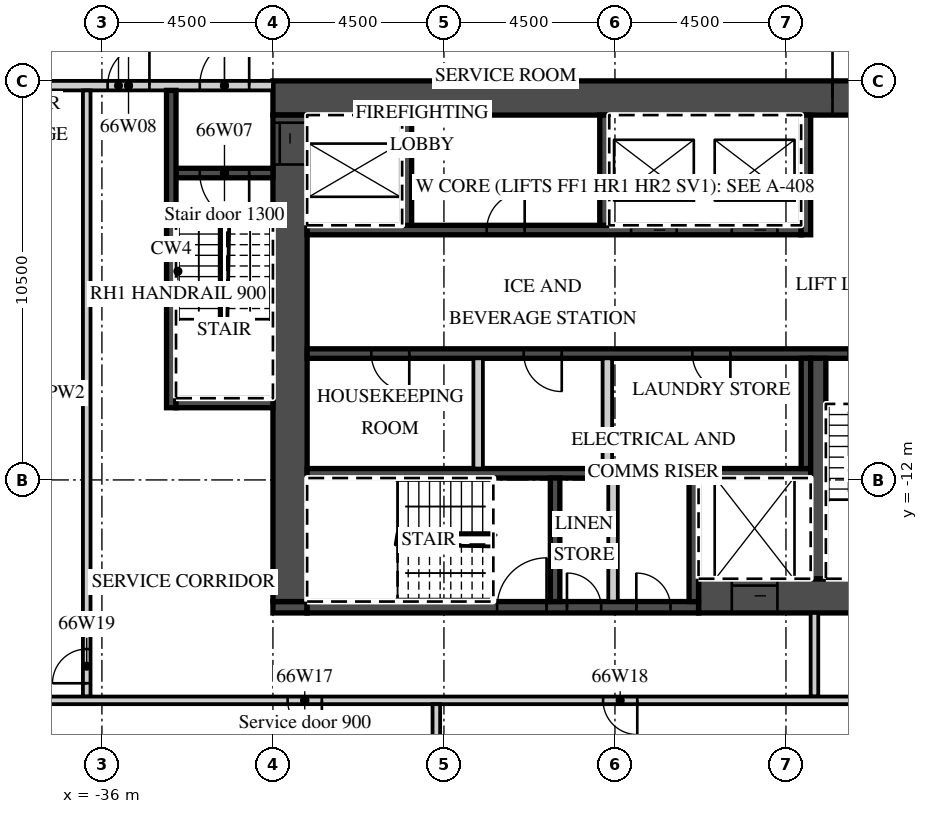
"""IFC4 building model, lengths in metres.
Left out: names, types, materials, properties, quantities, classifications, styles, units other than length and angle.
Written with IfcOpenShell. Run it as: python <this file> out.ifc"""

import sys

from ifc_helpers import new_model, si_unit, direction, frame, frame_2d, origin, place, context, subcontext, project, spatial, rectangle, extrude, element, fill, save


model = new_model("IFC4")
c1 = context("Model", 3, precision=1e-05, world=origin(), true_north=direction((0.0, 1.0)))
c2 = subcontext(c1, "Body", "Model", "MODEL_VIEW")
j1 = project(units=[si_unit("LENGTHUNIT", "METRE"), si_unit("PLANEANGLEUNIT", "RADIAN")], contexts=[c1])
p1 = place(None, origin())
s1 = spatial("IfcSite", under=j1, at=p1, CompositionType="ELEMENT")
p2 = place(p1, origin())
s2 = spatial("IfcBuilding", under=s1, at=p2, CompositionType="ELEMENT")
p3 = place(p2, frame((0.0, 0.0, 268.5)))
s3 = spatial("IfcBuildingStorey", under=s2, at=p3, CompositionType="ELEMENT", Elevation=268.5)
p4 = place(p3, frame((-31.5, -1.95, 0.0), z_axis=(0.0, 0.0, 1.0), x_axis=(1.0, 0.0, 0.0)))
e1 = element("IfcWall", 1, at=p4, inside=s3, PredefinedType="SHEAR", context=c2, shape_type="SweptSolid", body=[
    extrude(rectangle(XDim=18.0, YDim=0.9, at=frame_2d((9.0, 0.0))), origin(), (0.0, 0.0, 1.0), 3.02),
])
p5 = place(p4, frame((14.725, 0.0, 0.0)))
e2 = element("IfcOpeningElement", 2, at=p5, cuts=e1, PredefinedType="OPENING", context=c2, shape_type="SweptSolid", body=[
    extrude(rectangle(XDim=1.8, YDim=2.1, at=frame_2d((0.9, 1.05))), frame((0.0, 0.46, 0.0), z_axis=(0.0, -1.0, 0.0), x_axis=(1.0, 0.0, 0.0)), (0.0, 0.0, 1.0), 0.92),
])
p6 = place(p3, frame((-20.3, -15.05, 0.0), z_axis=(0.0, 0.0, 1.0), x_axis=(1.0, 0.0, 0.0)))
e3 = element("IfcWall", 3, at=p6, inside=s3, PredefinedType="SHEAR", context=c2, shape_type="SweptSolid", body=[
    extrude(rectangle(XDim=6.8, YDim=0.9, at=frame_2d((3.4, 0.0))), origin(), (0.0, 0.0, 1.0), 3.02),
])
p7 = place(p6, frame((0.875, 0.0, 0.0)))
e4 = element("IfcOpeningElement", 4, at=p7, cuts=e3, PredefinedType="OPENING", context=c2, shape_type="SweptSolid", body=[
    extrude(rectangle(XDim=1.2, YDim=2.1, at=frame_2d((0.6, 1.05))), frame((0.0, 0.46, 0.0), z_axis=(0.0, -1.0, 0.0), x_axis=(1.0, 0.0, 0.0)), (0.0, 0.0, 1.0), 0.92),
])
p8 = place(p3, frame((-31.5, -15.35, 0.0), z_axis=(0.0, 0.0, 1.0), x_axis=(1.0, 0.0, 0.0)))
e5 = element("IfcWall", 5, at=p8, inside=s3, PredefinedType="SHEAR", context=c2, shape_type="SweptSolid", body=[
    extrude(rectangle(XDim=0.9, YDim=0.3, at=frame_2d((0.45, 0.0))), origin(), (0.0, 0.0, 1.0), 3.02),
])
p9 = place(p3, frame((-30.6, -15.35, 0.0), z_axis=(0.0, 0.0, 1.0), x_axis=(1.0, 0.0, 0.0)))
e6 = element("IfcWall", 6, at=p9, inside=s3, PredefinedType="SHEAR", context=c2, shape_type="SweptSolid", body=[
    extrude(rectangle(XDim=10.3, YDim=0.3, at=frame_2d((5.15, 0.0))), origin(), (0.0, 0.0, 1.0), 3.02),
])
p10 = place(p9, frame((5.0, 0.0, 0.0)))
e7 = element("IfcOpeningElement", 7, at=p10, cuts=e6, PredefinedType="OPENING", context=c2, shape_type="SweptSolid", body=[
    extrude(rectangle(XDim=1.3, YDim=2.1, at=frame_2d((0.65, 1.05))), frame((0.0, 0.16, 0.0), z_axis=(0.0, -1.0, 0.0), x_axis=(1.0, 0.0, 0.0)), (0.0, 0.0, 1.0), 0.32),
])
p11 = place(p9, frame((6.837, 0.0, 0.0)))
e8 = element("IfcOpeningElement", 8, at=p11, cuts=e6, PredefinedType="OPENING", context=c2, shape_type="SweptSolid", body=[
    extrude(rectangle(XDim=0.9, YDim=2.1, at=frame_2d((0.45, 1.05))), frame((0.0, 0.16, 0.0), z_axis=(0.0, -1.0, 0.0), x_axis=(1.0, 0.0, 0.0)), (0.0, 0.0, 1.0), 0.32),
])
p12 = place(p9, frame((8.663, 0.0, 0.0)))
e9 = element("IfcOpeningElement", 9, at=p12, cuts=e6, PredefinedType="OPENING", context=c2, shape_type="SweptSolid", body=[
    extrude(rectangle(XDim=0.9, YDim=2.1, at=frame_2d((0.45, 1.05))), frame((0.0, 0.16, 0.0), z_axis=(0.0, -1.0, 0.0), x_axis=(1.0, 0.0, 0.0)), (0.0, 0.0, 1.0), 0.32),
])
p13 = place(p3, frame((-31.05, -15.2, 0.0), z_axis=(0.0, 0.0, 1.0), x_axis=(0.0, 1.0, 0.0)))
e10 = element("IfcWall", 10, at=p13, inside=s3, PredefinedType="SHEAR", context=c2, shape_type="SweptSolid", body=[
    extrude(rectangle(XDim=12.8, YDim=0.9, at=frame_2d((6.4, 0.0))), origin(), (0.0, 0.0, 1.0), 3.02),
])
p14 = place(p13, frame((11.5, 0.0, 0.0)))
e11 = element("IfcOpeningElement", 11, at=p14, cuts=e10, PredefinedType="OPENING", context=c2, shape_type="SweptSolid", body=[
    extrude(rectangle(XDim=1.1, YDim=2.1, at=frame_2d((0.55, 1.05))), frame((0.0, 0.46, 0.0), z_axis=(0.0, -1.0, 0.0), x_axis=(1.0, 0.0, 0.0)), (0.0, 0.0, 1.0), 0.92),
])
p15 = place(p3, frame((-30.6, -5.425, 0.0), z_axis=(0.0, 0.0, 1.0), x_axis=(1.0, 0.0, 0.0)))
e12 = element("IfcWall", 12, at=p15, inside=s3, PredefinedType="SHEAR", context=c2, shape_type="SweptSolid", body=[
    extrude(rectangle(XDim=13.0, YDim=0.25, at=frame_2d((6.5, 0.0))), origin(), (0.0, 0.0, 1.0), 3.02),
])
p16 = place(p15, frame((8.525, 0.0, 0.0)))
e13 = element("IfcOpeningElement", 13, at=p16, cuts=e12, PredefinedType="OPENING", context=c2, shape_type="SweptSolid", body=[
    extrude(rectangle(XDim=1.2, YDim=2.1, at=frame_2d((0.6, 1.05))), frame((0.0, 0.135, 0.0), z_axis=(0.0, -1.0, 0.0), x_axis=(1.0, 0.0, 0.0)), (0.0, 0.0, 1.0), 0.27),
])
p17 = place(p15, frame((11.175, 0.0, 0.0)))
e14 = element("IfcOpeningElement", 14, at=p17, cuts=e12, PredefinedType="OPENING", context=c2, shape_type="SweptSolid", body=[
    extrude(rectangle(XDim=1.2, YDim=2.1, at=frame_2d((0.6, 1.05))), frame((0.0, 0.135, 0.0), z_axis=(0.0, -1.0, 0.0), x_axis=(1.0, 0.0, 0.0)), (0.0, 0.0, 1.0), 0.27),
])
p18 = place(p15, frame((4.725, 0.0, 0.0)))
e15 = element("IfcOpeningElement", 15, at=p18, cuts=e12, PredefinedType="OPENING", context=c2, shape_type="SweptSolid", body=[
    extrude(rectangle(XDim=1.0, YDim=2.1, at=frame_2d((0.5, 1.05))), frame((0.0, 0.135, 0.0), z_axis=(0.0, -1.0, 0.0), x_axis=(1.0, 0.0, 0.0)), (0.0, 0.0, 1.0), 0.27),
])
p19 = place(p3, frame((-17.475, -5.55, 0.0), z_axis=(0.0, 0.0, 1.0), x_axis=(0.0, 1.0, 0.0)))
e16 = element("IfcWall", 16, at=p19, inside=s3, PredefinedType="SHEAR", context=c2, shape_type="SweptSolid", body=[
    extrude(rectangle(XDim=3.15, YDim=0.25, at=frame_2d((1.575, 0.0))), origin(), (0.0, 0.0, 1.0), 3.02),
])
for number, where, z_axis, x_axis in (
    (17, (-27.975, -5.3, 0.0), (0.0, 0.0, 1.0), (0.0, 1.0, 0.0)),
    (18, (-22.775, -5.3, 0.0), (0.0, 0.0, 1.0), (0.0, 1.0, 0.0)),
):
    element("IfcWall", number, at=place(p3, frame(where, z_axis=z_axis, x_axis=x_axis)), inside=s3, PredefinedType="SHEAR", context=c2, shape_type="SweptSolid", body=[
        extrude(rectangle(XDim=2.9, YDim=0.25, at=frame_2d((1.45, 0.0))), origin(), (0.0, 0.0, 1.0), 3.02),
    ])
p20 = place(p3, frame((-30.6, -8.675, 0.0), z_axis=(0.0, 0.0, 1.0), x_axis=(1.0, 0.0, 0.0)))
e19 = element("IfcWall", 19, at=p20, inside=s3, PredefinedType="SHEAR", context=c2, shape_type="SweptSolid", body=[
    extrude(rectangle(XDim=16.2, YDim=0.25, at=frame_2d((8.1, 0.0))), origin(), (0.0, 0.0, 1.0), 3.02),
])
p21 = place(p20, frame((14.25, 0.0, 0.0)))
e20 = element("IfcOpeningElement", 20, at=p21, cuts=e19, PredefinedType="OPENING", context=c2, shape_type="SweptSolid", body=[
    extrude(rectangle(XDim=1.3, YDim=2.1, at=frame_2d((0.65, 1.05))), frame((0.0, 0.135, 0.0), z_axis=(0.0, -1.0, 0.0), x_axis=(1.0, 0.0, 0.0)), (0.0, 0.0, 1.0), 0.27),
])
p22 = place(p20, frame((1.688, 0.0, 0.0)))
e21 = element("IfcOpeningElement", 21, at=p22, cuts=e19, PredefinedType="OPENING", context=c2, shape_type="SweptSolid", body=[
    extrude(rectangle(XDim=1.0, YDim=2.1, at=frame_2d((0.5, 1.05))), frame((0.0, 0.135, 0.0), z_axis=(0.0, -1.0, 0.0), x_axis=(1.0, 0.0, 0.0)), (0.0, 0.0, 1.0), 0.27),
])
p23 = place(p20, frame((5.7, 0.0, 0.0)))
e22 = element("IfcOpeningElement", 22, at=p23, cuts=e19, PredefinedType="OPENING", context=c2, shape_type="SweptSolid", body=[
    extrude(rectangle(XDim=1.0, YDim=2.1, at=frame_2d((0.5, 1.05))), frame((0.0, 0.135, 0.0), z_axis=(0.0, -1.0, 0.0), x_axis=(1.0, 0.0, 0.0)), (0.0, 0.0, 1.0), 0.27),
])
p24 = place(p20, frame((10.137, 0.0, 0.0)))
e23 = element("IfcOpeningElement", 23, at=p24, cuts=e19, PredefinedType="OPENING", context=c2, shape_type="SweptSolid", body=[
    extrude(rectangle(XDim=1.0, YDim=2.1, at=frame_2d((0.5, 1.05))), frame((0.0, 0.135, 0.0), z_axis=(0.0, -1.0, 0.0), x_axis=(1.0, 0.0, 0.0)), (0.0, 0.0, 1.0), 0.27),
])
p25 = place(p3, frame((-30.6, -11.825, 0.0), z_axis=(0.0, 0.0, 1.0), x_axis=(1.0, 0.0, 0.0)))
e24 = element("IfcWall", 24, at=p25, inside=s3, PredefinedType="SHEAR", context=c2, shape_type="SweptSolid", body=[
    extrude(rectangle(XDim=13.25, YDim=0.25, at=frame_2d((6.625, 0.0))), origin(), (0.0, 0.0, 1.0), 3.02),
])
p26 = place(p3, frame((-17.475, -11.7, 0.0), z_axis=(0.0, 0.0, 1.0), x_axis=(0.0, 1.0, 0.0)))
e25 = element("IfcWall", 25, at=p26, inside=s3, PredefinedType="SHEAR", context=c2, shape_type="SweptSolid", body=[
    extrude(rectangle(XDim=2.9, YDim=0.25, at=frame_2d((1.45, 0.0))), origin(), (0.0, 0.0, 1.0), 3.02),
])
for number, where, z_axis, x_axis in (
    (26, (-26.1, -11.7, 0.0), (0.0, 0.0, 1.0), (0.0, 1.0, 0.0)),
    (27, (-22.7, -11.7, 0.0), (0.0, 0.0, 1.0), (0.0, 1.0, 0.0)),
):
    element("IfcWall", number, at=place(p3, frame(where, z_axis=z_axis, x_axis=x_axis)), inside=s3, PredefinedType="PARTITIONING", context=c2, shape_type="SweptSolid", body=[
        extrude(rectangle(XDim=2.9, YDim=0.25, at=frame_2d((1.45, 0.0))), origin(), (0.0, 0.0, 1.0), 3.02),
    ])
p27 = place(p3, frame((-17.15, -14.6, 0.0), z_axis=(0.0, 0.0, 1.0), x_axis=(0.0, 1.0, 0.0)))
e28 = element("IfcWall", 28, at=p27, inside=s3, PredefinedType="SHEAR", context=c2, shape_type="SweptSolid", body=[
    extrude(rectangle(XDim=5.8, YDim=0.4, at=frame_2d((2.9, 0.0))), origin(), (0.0, 0.0, 1.0), 3.02),
])
for number, where, z_axis, x_axis in (
    (29, (-20.425, -15.2, 0.0), (0.0, 0.0, 1.0), (0.0, 1.0, 0.0)),
    (30, (-24.075, -15.2, 0.0), (0.0, 0.0, 1.0), (0.0, 1.0, 0.0)),
):
    element("IfcWall", number, at=place(p3, frame(where, z_axis=z_axis, x_axis=x_axis)), inside=s3, PredefinedType="SHEAR", context=c2, shape_type="SweptSolid", body=[
        extrude(rectangle(XDim=3.25, YDim=0.25, at=frame_2d((1.625, 0.0))), origin(), (0.0, 0.0, 1.0), 3.02),
    ])
p28 = place(p3, frame((-22.55, -15.2, 0.0), z_axis=(0.0, 0.0, 1.0), x_axis=(0.0, 1.0, 0.0)))
e31 = element("IfcWall", 31, at=p28, inside=s3, PredefinedType="PARTITIONING", context=c2, shape_type="SweptSolid", body=[
    extrude(rectangle(XDim=3.25, YDim=0.25, at=frame_2d((1.625, 0.0))), origin(), (0.0, 0.0, 1.0), 3.02),
])
p29 = place(p3, frame((-39.627, -1.625, 0.0), z_axis=(0.0, 0.0, 1.0), x_axis=(1.0, 0.0, 0.0)))
e32 = element("IfcWall", 32, at=p29, inside=s3, PredefinedType="PARTITIONING", context=c2, shape_type="SweptSolid", body=[
    extrude(rectangle(XDim=8.127, YDim=0.25, at=frame_2d((4.063, 0.0))), origin(), (0.0, 0.0, 1.0), 3.02),
])
p30 = place(p29, frame((6.202, 0.0, 0.0)))
e33 = element("IfcOpeningElement", 33, at=p30, cuts=e32, PredefinedType="OPENING", context=c2, shape_type="SweptSolid", body=[
    extrude(rectangle(XDim=1.3, YDim=2.1, at=frame_2d((0.65, 1.05))), frame((0.0, 0.135, 0.0), z_axis=(0.0, -1.0, 0.0), x_axis=(1.0, 0.0, 0.0)), (0.0, 0.0, 1.0), 0.27),
])
p31 = place(p29, frame((3.777, 0.0, 0.0)))
e34 = element("IfcOpeningElement", 34, at=p31, cuts=e32, PredefinedType="OPENING", context=c2, shape_type="SweptSolid", body=[
    extrude(rectangle(XDim=1.1, YDim=2.1, at=frame_2d((0.55, 1.05))), frame((0.0, 0.135, 0.0), z_axis=(0.0, -1.0, 0.0), x_axis=(1.0, 0.0, 0.0)), (0.0, 0.0, 1.0), 0.27),
])
p32 = place(p3, frame((-34.05, -3.925, 0.0), z_axis=(0.0, 0.0, 1.0), x_axis=(1.0, 0.0, 0.0)))
e35 = element("IfcWall", 35, at=p32, inside=s3, PredefinedType="SHEAR", context=c2, shape_type="SweptSolid", body=[
    extrude(rectangle(XDim=2.55, YDim=0.25, at=frame_2d((1.275, 0.0))), origin(), (0.0, 0.0, 1.0), 3.02),
])
p33 = place(p32, frame((0.625, 0.0, 0.0)))
e36 = element("IfcOpeningElement", 36, at=p33, cuts=e35, PredefinedType="OPENING", context=c2, shape_type="SweptSolid", body=[
    extrude(rectangle(XDim=1.3, YDim=2.1, at=frame_2d((0.65, 1.05))), frame((0.0, 0.135, 0.0), z_axis=(0.0, -1.0, 0.0), x_axis=(1.0, 0.0, 0.0)), (0.0, 0.0, 1.0), 0.27),
])
p34 = place(p3, frame((-34.175, -10.1, 0.0), z_axis=(0.0, 0.0, 1.0), x_axis=(0.0, 1.0, 0.0)))
e37 = element("IfcWall", 37, at=p34, inside=s3, PredefinedType="SHEAR", context=c2, shape_type="SweptSolid", body=[
    extrude(rectangle(XDim=8.35, YDim=0.25, at=frame_2d((4.175, 0.0))), origin(), (0.0, 0.0, 1.0), 3.02),
])
p35 = place(p3, frame((-34.05, -9.975, 0.0), z_axis=(0.0, 0.0, 1.0), x_axis=(1.0, 0.0, 0.0)))
e38 = element("IfcWall", 38, at=p35, inside=s3, PredefinedType="SHEAR", context=c2, shape_type="SweptSolid", body=[
    extrude(rectangle(XDim=2.55, YDim=0.25, at=frame_2d((1.275, 0.0))), origin(), (0.0, 0.0, 1.0), 3.02),
])
p36 = place(p3, frame((-17.25, -17.7, 0.0), z_axis=(0.0, 0.0, 1.0), x_axis=(0.0, 1.0, 0.0)))
e39 = element("IfcWall", 39, at=p36, inside=s3, PredefinedType="PARTITIONING", context=c2, shape_type="SweptSolid", body=[
    extrude(rectangle(XDim=2.2, YDim=0.2, at=frame_2d((1.1, 0.0))), origin(), (0.0, 0.0, 1.0), 3.02),
])
p37 = place(p3, frame((-36.4, -17.7, 0.0), z_axis=(0.0, 0.0, 1.0), x_axis=(0.0, 1.0, 0.0)))
e40 = element("IfcWall", 40, at=p37, inside=s3, PredefinedType="PARTITIONING", context=c2, shape_type="SweptSolid", body=[
    extrude(rectangle(XDim=15.95, YDim=0.2, at=frame_2d((7.975, 0.0))), origin(), (0.0, 0.0, 1.0), 3.02),
])
p38 = place(p37, frame((0.35, 0.0, 0.0)))
e41 = element("IfcOpeningElement", 41, at=p38, cuts=e40, PredefinedType="OPENING", context=c2, shape_type="SweptSolid", body=[
    extrude(rectangle(XDim=0.9, YDim=2.1, at=frame_2d((0.45, 1.05))), frame((0.0, 0.11, 0.0), z_axis=(0.0, -1.0, 0.0), x_axis=(1.0, 0.0, 0.0)), (0.0, 0.0, 1.0), 0.22),
])
p39 = place(p3, frame((-38.07, -17.8, 0.0), z_axis=(0.0, 0.0, 1.0), x_axis=(1.0, 0.0, 0.0)))
e42 = element("IfcWall", 42, at=p39, inside=s3, PredefinedType="PARTITIONING", context=c2, shape_type="SweptSolid", body=[
    extrude(rectangle(XDim=24.47, YDim=0.2, at=frame_2d((12.235, 0.0))), origin(), (0.0, 0.0, 1.0), 3.02),
])
p40 = place(p39, frame((6.957, 0.0, 0.0)))
e43 = element("IfcOpeningElement", 43, at=p40, cuts=e42, PredefinedType="OPENING", context=c2, shape_type="SweptSolid", body=[
    extrude(rectangle(XDim=0.9, YDim=2.1, at=frame_2d((0.45, 1.05))), frame((0.0, 0.11, 0.0), z_axis=(0.0, -1.0, 0.0), x_axis=(1.0, 0.0, 0.0)), (0.0, 0.0, 1.0), 0.22),
])
p41 = place(p39, frame((15.257, 0.0, 0.0)))
e44 = element("IfcOpeningElement", 44, at=p41, cuts=e42, PredefinedType="OPENING", context=c2, shape_type="SweptSolid", body=[
    extrude(rectangle(XDim=0.9, YDim=2.1, at=frame_2d((0.45, 1.05))), frame((0.0, 0.11, 0.0), z_axis=(0.0, -1.0, 0.0), x_axis=(1.0, 0.0, 0.0)), (0.0, 0.0, 1.0), 0.22),
])
p42 = place(p3, frame((-27.2, -22.716, 0.0), z_axis=(0.0, 0.0, 1.0), x_axis=(0.0, 1.0, 0.0)))
e45 = element("IfcWall", 45, at=p42, inside=s3, PredefinedType="PARTITIONING", context=c2, shape_type="SweptSolid", body=[
    extrude(rectangle(XDim=4.816, YDim=0.2, at=frame_2d((2.408, 0.0))), origin(), (0.0, 0.0, 1.0), 3.02),
])
p43 = place(p16, origin())
e46 = element("IfcDoor", 46, at=p43, inside=s3, OperationType="SLIDING_TO_LEFT", PredefinedType="DOOR", context=c2, shape_type="SweptSolid", body=[
    extrude(rectangle(XDim=1.2, YDim=2.1, at=frame_2d((0.6, 1.05))), frame((0.0, 0.025, 0.0), z_axis=(0.0, -1.0, 0.0), x_axis=(1.0, 0.0, 0.0)), (0.0, 0.0, 1.0), 0.05),
])
fill(e13, e46)
p44 = place(p17, origin())
e47 = element("IfcDoor", 47, at=p44, inside=s3, OperationType="SLIDING_TO_RIGHT", PredefinedType="DOOR", context=c2, shape_type="SweptSolid", body=[
    extrude(rectangle(XDim=1.2, YDim=2.1, at=frame_2d((0.6, 1.05))), frame((0.0, 0.025, 0.0), z_axis=(0.0, -1.0, 0.0), x_axis=(1.0, 0.0, 0.0)), (0.0, 0.0, 1.0), 0.05),
])
fill(e14, e47)
p45 = place(p7, origin())
e48 = element("IfcDoor", 48, at=p45, inside=s3, OperationType="SLIDING_TO_LEFT", PredefinedType="DOOR", context=c2, shape_type="SweptSolid", body=[
    extrude(rectangle(XDim=1.2, YDim=2.1, at=frame_2d((0.6, 1.05))), frame((0.0, 0.025, 0.0), z_axis=(0.0, -1.0, 0.0), x_axis=(1.0, 0.0, 0.0)), (0.0, 0.0, 1.0), 0.05),
])
fill(e4, e48)
p46 = place(p14, origin())
e49 = element("IfcDoor", 49, at=p46, inside=s3, OperationType="SLIDING_TO_RIGHT", PredefinedType="DOOR", context=c2, shape_type="SweptSolid", body=[
    extrude(rectangle(XDim=1.1, YDim=2.1, at=frame_2d((0.55, 1.05))), frame((0.0, 0.025, 0.0), z_axis=(0.0, -1.0, 0.0), x_axis=(1.0, 0.0, 0.0)), (0.0, 0.0, 1.0), 0.05),
])
fill(e11, e49)
p47 = place(p5, origin())
e50 = element("IfcDoor", 50, at=p47, inside=s3, OperationType="DOUBLE_DOOR_DOUBLE_SWING", PredefinedType="DOOR", context=c2, shape_type="SweptSolid", body=[
    extrude(rectangle(XDim=1.8, YDim=2.1, at=frame_2d((0.9, 1.05))), frame((0.0, 0.025, 0.0), z_axis=(0.0, -1.0, 0.0), x_axis=(1.0, 0.0, 0.0)), (0.0, 0.0, 1.0), 0.05),
])
fill(e2, e50)
p48 = place(p30, origin())
e51 = element("IfcDoor", 51, at=p48, inside=s3, OperationType="SINGLE_SWING_RIGHT", PredefinedType="DOOR", context=c2, shape_type="SweptSolid", body=[
    extrude(rectangle(XDim=1.3, YDim=2.1, at=frame_2d((0.65, 1.05))), frame((0.0, 0.025, 0.0), z_axis=(0.0, -1.0, 0.0), x_axis=(1.0, 0.0, 0.0)), (0.0, 0.0, 1.0), 0.05),
])
fill(e33, e51)
p49 = place(p33, origin())
e52 = element("IfcDoor", 52, at=p49, inside=s3, OperationType="SINGLE_SWING_RIGHT", PredefinedType="DOOR", context=c2, shape_type="SweptSolid", body=[
    extrude(rectangle(XDim=1.3, YDim=2.1, at=frame_2d((0.65, 1.05))), frame((0.0, 0.025, 0.0), z_axis=(0.0, -1.0, 0.0), x_axis=(1.0, 0.0, 0.0)), (0.0, 0.0, 1.0), 0.05),
])
fill(e36, e52)
p50 = place(p31, origin())
e53 = element("IfcDoor", 53, at=p50, inside=s3, OperationType="SINGLE_SWING_RIGHT", PredefinedType="DOOR", context=c2, shape_type="SweptSolid", body=[
    extrude(rectangle(XDim=1.1, YDim=2.1, at=frame_2d((0.55, 1.05))), frame((0.0, 0.025, 0.0), z_axis=(0.0, -1.0, 0.0), x_axis=(1.0, 0.0, 0.0)), (0.0, 0.0, 1.0), 0.05),
])
fill(e34, e53)
p51 = place(p21, origin())
e54 = element("IfcDoor", 54, at=p51, inside=s3, OperationType="SINGLE_SWING_RIGHT", PredefinedType="DOOR", context=c2, shape_type="SweptSolid", body=[
    extrude(rectangle(XDim=1.3, YDim=2.1, at=frame_2d((0.65, 1.05))), frame((0.0, 0.025, 0.0), z_axis=(0.0, -1.0, 0.0), x_axis=(1.0, 0.0, 0.0)), (0.0, 0.0, 1.0), 0.05),
])
fill(e20, e54)
p52 = place(p10, origin())
e55 = element("IfcDoor", 55, at=p52, inside=s3, OperationType="SINGLE_SWING_RIGHT", PredefinedType="DOOR", context=c2, shape_type="SweptSolid", body=[
    extrude(rectangle(XDim=1.3, YDim=2.1, at=frame_2d((0.65, 1.05))), frame((0.0, 0.025, 0.0), z_axis=(0.0, -1.0, 0.0), x_axis=(1.0, 0.0, 0.0)), (0.0, 0.0, 1.0), 0.05),
])
fill(e7, e55)
p53 = place(p11, origin())
e56 = element("IfcDoor", 56, at=p53, inside=s3, OperationType="SINGLE_SWING_LEFT", PredefinedType="DOOR", context=c2, shape_type="SweptSolid", body=[
    extrude(rectangle(XDim=0.9, YDim=2.1, at=frame_2d((0.45, 1.05))), frame((0.0, 0.025, 0.0), z_axis=(0.0, -1.0, 0.0), x_axis=(1.0, 0.0, 0.0)), (0.0, 0.0, 1.0), 0.05),
])
fill(e8, e56)
p54 = place(p12, origin())
e57 = element("IfcDoor", 57, at=p54, inside=s3, OperationType="SINGLE_SWING_LEFT", PredefinedType="DOOR", context=c2, shape_type="SweptSolid", body=[
    extrude(rectangle(XDim=0.9, YDim=2.1, at=frame_2d((0.45, 1.05))), frame((0.0, 0.025, 0.0), z_axis=(0.0, -1.0, 0.0), x_axis=(1.0, 0.0, 0.0)), (0.0, 0.0, 1.0), 0.05),
])
fill(e9, e57)
p55 = place(p22, origin())
e58 = element("IfcDoor", 58, at=p55, inside=s3, OperationType="SINGLE_SWING_RIGHT", PredefinedType="DOOR", context=c2, shape_type="SweptSolid", body=[
    extrude(rectangle(XDim=1.0, YDim=2.1, at=frame_2d((0.5, 1.05))), frame((0.0, 0.025, 0.0), z_axis=(0.0, -1.0, 0.0), x_axis=(1.0, 0.0, 0.0)), (0.0, 0.0, 1.0), 0.05),
])
fill(e21, e58)
p56 = place(p23, origin())
e59 = element("IfcDoor", 59, at=p56, inside=s3, OperationType="SINGLE_SWING_RIGHT", PredefinedType="DOOR", context=c2, shape_type="SweptSolid", body=[
    extrude(rectangle(XDim=1.0, YDim=2.1, at=frame_2d((0.5, 1.05))), frame((0.0, 0.025, 0.0), z_axis=(0.0, -1.0, 0.0), x_axis=(1.0, 0.0, 0.0)), (0.0, 0.0, 1.0), 0.05),
])
fill(e22, e59)
p57 = place(p24, origin())
e60 = element("IfcDoor", 60, at=p57, inside=s3, OperationType="SINGLE_SWING_RIGHT", PredefinedType="DOOR", context=c2, shape_type="SweptSolid", body=[
    extrude(rectangle(XDim=1.0, YDim=2.1, at=frame_2d((0.5, 1.05))), frame((0.0, 0.025, 0.0), z_axis=(0.0, -1.0, 0.0), x_axis=(1.0, 0.0, 0.0)), (0.0, 0.0, 1.0), 0.05),
])
fill(e23, e60)
p58 = place(p18, origin())
e61 = element("IfcDoor", 61, at=p58, inside=s3, OperationType="SINGLE_SWING_RIGHT", PredefinedType="DOOR", context=c2, shape_type="SweptSolid", body=[
    extrude(rectangle(XDim=1.0, YDim=2.1, at=frame_2d((0.5, 1.05))), frame((0.0, 0.025, 0.0), z_axis=(0.0, -1.0, 0.0), x_axis=(1.0, 0.0, 0.0)), (0.0, 0.0, 1.0), 0.05),
])
fill(e15, e61)
p59 = place(p40, origin())
e62 = element("IfcDoor", 62, at=p59, inside=s3, OperationType="SINGLE_SWING_RIGHT", PredefinedType="DOOR", context=c2, shape_type="SweptSolid", body=[
    extrude(rectangle(XDim=0.9, YDim=2.1, at=frame_2d((0.45, 1.05))), frame((0.0, 0.025, 0.0), z_axis=(0.0, -1.0, 0.0), x_axis=(1.0, 0.0, 0.0)), (0.0, 0.0, 1.0), 0.05),
])
fill(e43, e62)
p60 = place(p41, origin())
e63 = element("IfcDoor", 63, at=p60, inside=s3, OperationType="SINGLE_SWING_RIGHT", PredefinedType="DOOR", context=c2, shape_type="SweptSolid", body=[
    extrude(rectangle(XDim=0.9, YDim=2.1, at=frame_2d((0.45, 1.05))), frame((0.0, 0.025, 0.0), z_axis=(0.0, -1.0, 0.0), x_axis=(1.0, 0.0, 0.0)), (0.0, 0.0, 1.0), 0.05),
])
fill(e44, e63)
p61 = place(p38, origin())
e64 = element("IfcDoor", 64, at=p61, inside=s3, OperationType="SINGLE_SWING_LEFT", PredefinedType="DOOR", context=c2, shape_type="SweptSolid", body=[
    extrude(rectangle(XDim=0.9, YDim=2.1, at=frame_2d((0.45, 1.05))), frame((0.0, 0.025, 0.0), z_axis=(0.0, -1.0, 0.0), x_axis=(1.0, 0.0, 0.0)), (0.0, 0.0, 1.0), 0.05),
])
fill(e41, e64)
save(model, sys.argv[1])
